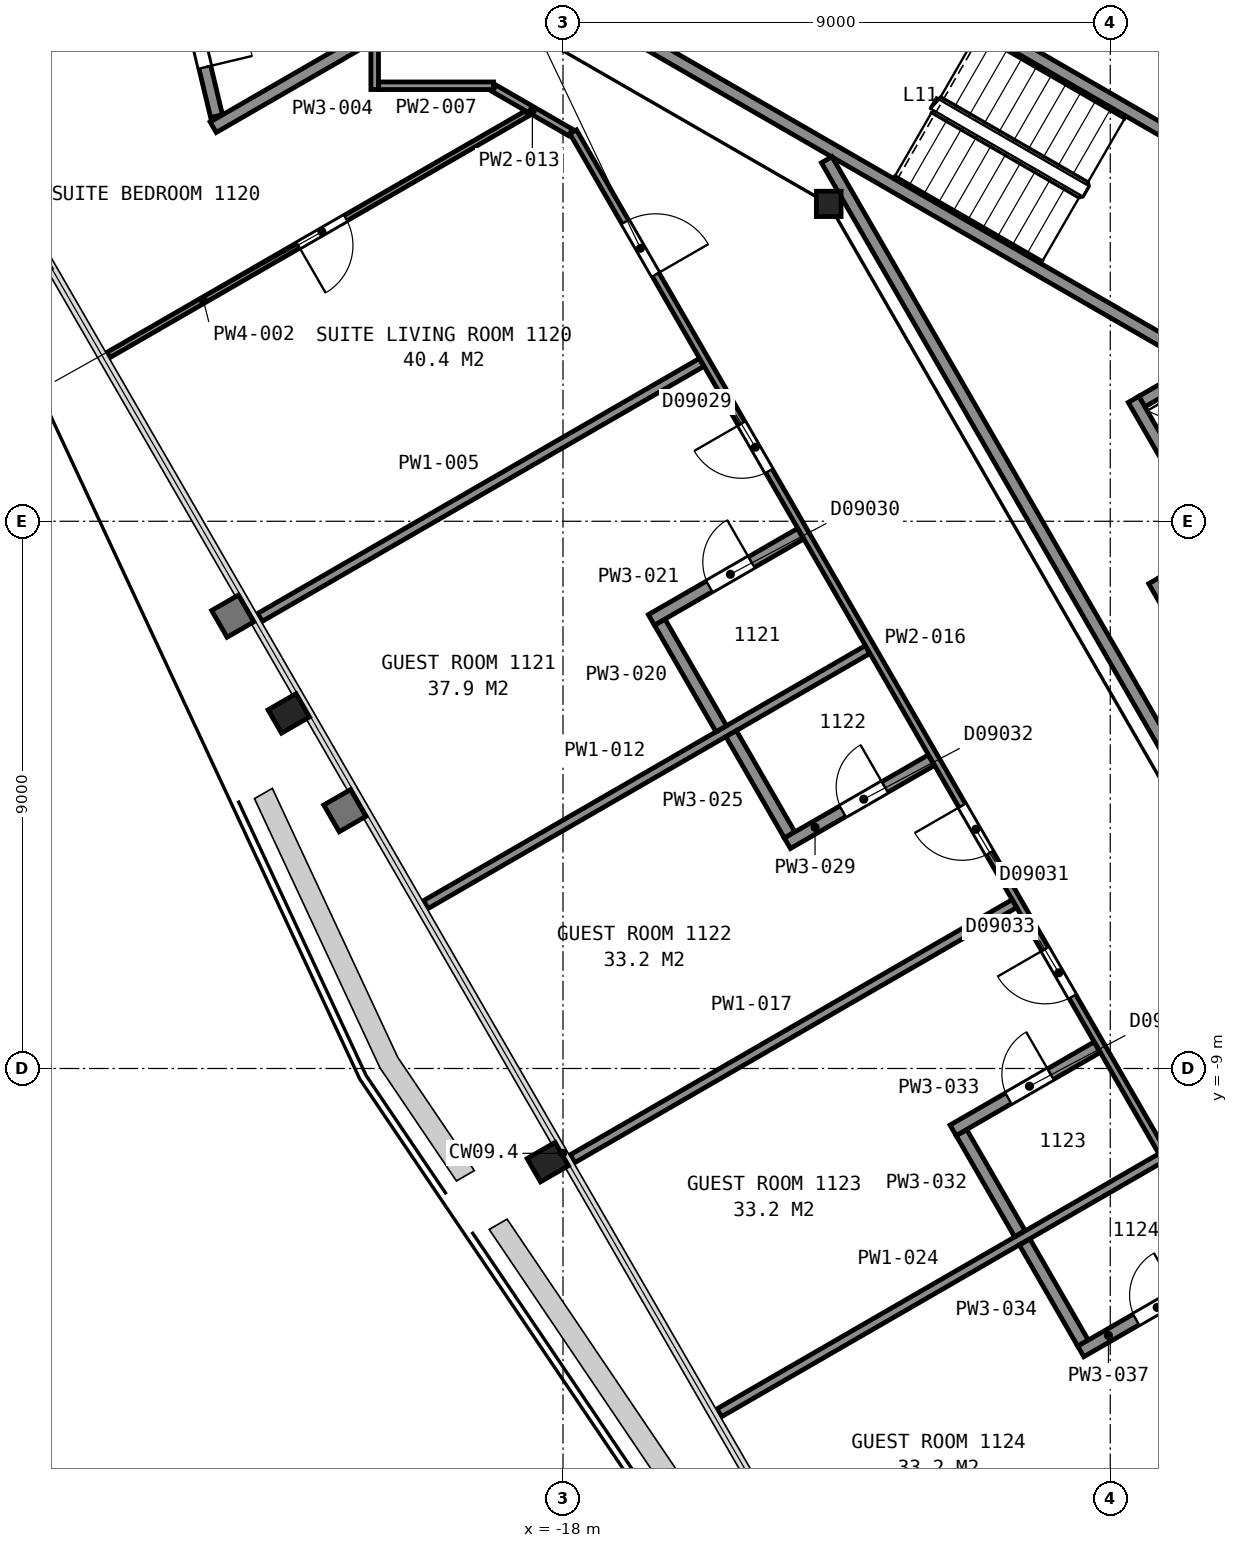
"""IFC4 building model, lengths in metres.
Left out: names, types, materials, properties, quantities, classifications, styles, units other than length and angle.
Written with IfcOpenShell. Run it as: python <this file> out.ifc"""

import sys

from ifc_helpers import new_model, si_unit, direction, frame, frame_2d, origin, origin_2d, place, context, subcontext, project, spatial, rectangle, i_section, extrude, element, fill, save


model = new_model("IFC4")
c1 = context("Model", 3, precision=1e-05, world=origin(), true_north=direction((0.0, 1.0)))
c2 = subcontext(c1, "Body", "Model", "MODEL_VIEW")
j1 = project(units=[si_unit("LENGTHUNIT", "METRE"), si_unit("PLANEANGLEUNIT", "RADIAN")], contexts=[c1])
p1 = place(None, origin())
s1 = spatial("IfcSite", under=j1, at=p1, CompositionType="ELEMENT")
p2 = place(p1, origin())
s2 = spatial("IfcBuilding", under=s1, at=p2, CompositionType="ELEMENT")
p3 = place(p2, frame((0.0, 0.0, 54.8)))
s3 = spatial("IfcBuildingStorey", under=s2, at=p3, CompositionType="ELEMENT", Elevation=54.8)
for number, where, z_axis, x_axis in (
    (1, (-22.51, -3.16, 0.0), (0.0, 0.0, 1.0), (-0.5, 0.866, 0.0)),
    (2, (-18.25, -10.54, 0.0), (0.0, 0.0, 1.0), (-0.5, 0.866, 0.0)),
):
    element("IfcColumn", number, at=place(p3, frame(where, z_axis=z_axis, x_axis=x_axis)), inside=s3, PredefinedType="COLUMN", context=c2, shape_type="SweptSolid", body=[
        extrude(i_section(OverallWidth=0.442, OverallDepth=0.531, WebThickness=0.066, FlangeThickness=0.106, FilletRadius=0.015, at=origin_2d()), origin(), (0.0, 0.0, 1.0), 3.6),
    ])
p4 = place(p3, frame((-13.63, 5.22, 0.0), z_axis=(0.0, 0.0, 1.0), x_axis=(1.0, 0.0, 0.0)))
e3 = element("IfcColumn", 3, at=p4, inside=s3, PredefinedType="COLUMN", context=c2, shape_type="SweptSolid", body=[
    extrude(i_section(OverallWidth=0.406, OverallDepth=0.417, WebThickness=0.03, FlangeThickness=0.048, FilletRadius=0.015, at=origin_2d()), origin(), (0.0, 0.0, 1.0), 3.6),
])
for number, where, z_axis, x_axis in (
    (4, (-7.678, 2.701, 0.0), (0.0, 0.0, 1.0), (-0.866, 0.5, 0.0)),
    (5, (-6.178, 5.299, 0.0), (0.0, 0.0, 1.0), (-0.866, 0.5, 0.0)),
):
    element("IfcWall", number, at=place(p3, frame(where, z_axis=z_axis, x_axis=x_axis)), inside=s3, PredefinedType="PARTITIONING", context=c2, shape_type="SweptSolid", body=[
        extrude(rectangle(XDim=12.0, YDim=0.2, at=frame_2d((6.0, 0.0))), origin(), (0.0, 0.0, 1.0), 3.35),
    ])
p5 = place(p3, frame((-8.48, 1.969, 0.0), z_axis=(0.0, 0.0, 1.0), x_axis=(0.866000020948, 0.500043961785, 0.0)))
e6 = element("IfcWall", 6, at=p5, inside=s3, PredefinedType="PARTITIONING", context=c2, shape_type="SweptSolid", body=[
    extrude(rectangle(XDim=1.95, YDim=0.2, at=frame_2d((0.975, 0.0))), origin(), (0.0, 0.0, 1.0), 3.6),
])
p6 = place(p3, frame((-7.242, -0.376, 0.0), z_axis=(0.0, 0.0, 1.0), x_axis=(-0.499996545922, 0.866027397988, 0.0)))
e7 = element("IfcWall", 7, at=p6, inside=s3, PredefinedType="PARTITIONING", context=c2, shape_type="SweptSolid", body=[
    extrude(rectangle(XDim=2.75, YDim=0.2, at=frame_2d((1.375, 0.0))), origin(), (0.0, 0.0, 1.0), 3.6),
])
p7 = place(p3, frame((-7.006, -3.185, 0.0), z_axis=(0.0, 0.0, 1.0), x_axis=(-0.499990435942, 0.866030925526, 0.0)))
e8 = element("IfcWall", 8, at=p7, inside=s3, PredefinedType="PARTITIONING", context=c2, shape_type="SweptSolid", body=[
    extrude(rectangle(XDim=2.55, YDim=0.2, at=frame_2d((1.275, 0.0))), origin(), (0.0, 0.0, 1.0), 3.6),
])
p8 = place(p3, frame((-13.664, 5.946, 0.0), z_axis=(0.0, 0.0, 1.0), x_axis=(0.499994327219, -0.866028678941, 0.0)))
e9 = element("IfcWall", 9, at=p8, inside=s3, PredefinedType="PARTITIONING", context=c2, shape_type="SweptSolid", body=[
    extrude(rectangle(XDim=23.968, YDim=0.2, at=frame_2d((11.984, 0.0))), origin(), (0.0, 0.0, 1.0), 3.35),
])
p9 = place(p3, frame((-27.967, 7.05, 0.0), z_axis=(0.0, 0.0, 1.0), x_axis=(0.86603249375, 0.499987719618, 0.0)))
e10 = element("IfcWall", 10, at=p9, inside=s3, PredefinedType="PARTITIONING", context=c2, shape_type="SweptSolid", body=[
    extrude(rectangle(XDim=8.392, YDim=0.15, at=frame_2d((4.196, 0.0))), origin(), (0.0, 0.0, 1.0), 2.613),
])
p10 = place(p3, frame((-25.476, 2.735, 0.0), z_axis=(0.0, 0.0, 1.0), x_axis=(0.866077639848, 0.499909513568, 0.0)))
e11 = element("IfcWall", 11, at=p10, inside=s3, PredefinedType="PARTITIONING", context=c2, shape_type="SweptSolid", body=[
    extrude(rectangle(XDim=7.946, YDim=0.1, at=frame_2d((3.973, 0.0))), origin(), (0.0, 0.0, 1.0), 2.613),
])
p11 = place(p10, frame((3.604, 0.0, 0.0)))
e12 = element("IfcOpeningElement", 12, at=p11, cuts=e11, PredefinedType="OPENING", context=c2, shape_type="SweptSolid", body=[
    extrude(rectangle(XDim=0.9, YDim=2.1, at=frame_2d((0.45, 1.05))), frame((0.0, 0.06, 0.0), z_axis=(0.0, -1.0, 0.0), x_axis=(1.0, 0.0, 0.0)), (0.0, 0.0, 1.0), 0.12),
])
p12 = place(p3, frame((-24.272, 9.064, 0.0), z_axis=(0.0, 0.0, 1.0), x_axis=(0.232636237171, -0.972563818551, 0.0)))
e13 = element("IfcWall", 13, at=p12, inside=s3, PredefinedType="PARTITIONING", context=c2, shape_type="SweptSolid", body=[
    extrude(rectangle(XDim=2.469, YDim=0.2, at=frame_2d((1.235, 0.0))), origin(), (0.0, 0.0, 1.0), 2.613),
])
p13 = place(p12, frame((0.842, 0.0, 0.0)))
e14 = element("IfcOpeningElement", 14, at=p13, cuts=e13, PredefinedType="OPENING", context=c2, shape_type="SweptSolid", body=[
    extrude(rectangle(XDim=0.8, YDim=2.1, at=frame_2d((0.4, 1.05))), frame((0.0, 0.11, 0.0), z_axis=(0.0, -1.0, 0.0), x_axis=(1.0, 0.0, 0.0)), (0.0, 0.0, 1.0), 0.22),
])
p14 = place(p3, frame((-23.753, 6.481, 0.0), z_axis=(0.0, 0.0, 1.0), x_axis=(0.866070680301, 0.499921570572, 0.0)))
e15 = element("IfcWall", 15, at=p14, inside=s3, PredefinedType="PARTITIONING", context=c2, shape_type="SweptSolid", body=[
    extrude(rectangle(XDim=2.937, YDim=0.2, at=frame_2d((1.468, 0.0))), origin(), (0.0, 0.0, 1.0), 2.613),
])
p15 = place(p3, frame((-22.984, -1.581, 0.0), z_axis=(0.0, 0.0, 1.0), x_axis=(0.866040157966, 0.499974444137, 0.0)))
e16 = element("IfcWall", 16, at=p15, inside=s3, PredefinedType="PARTITIONING", context=c2, shape_type="SweptSolid", body=[
    extrude(rectangle(XDim=8.387, YDim=0.15, at=frame_2d((4.193, 0.0))), origin(), (0.0, 0.0, 1.0), 2.613),
])
p16 = place(p3, frame((-21.097, 7.101, 0.0), z_axis=(0.0, 0.0, 1.0), x_axis=(0.0, 1.0, 0.0)))
e17 = element("IfcWall", 17, at=p16, inside=s3, PredefinedType="PARTITIONING", context=c2, shape_type="SweptSolid", body=[
    extrude(rectangle(XDim=3.119, YDim=0.125, at=frame_2d((1.56, 0.0))), origin(), (0.0, 0.0, 1.0), 2.613),
])
p17 = place(p3, frame((-21.032, 7.163, 0.0), z_axis=(0.0, 0.0, 1.0), x_axis=(1.0, 0.0, 0.0)))
e18 = element("IfcWall", 18, at=p17, inside=s3, PredefinedType="PARTITIONING", context=c2, shape_type="SweptSolid", body=[
    extrude(rectangle(XDim=1.888, YDim=0.125, at=frame_2d((0.944, 0.0))), origin(), (0.0, 0.0, 1.0), 2.613),
])
p18 = place(p3, frame((-20.256, -6.305, 0.0), z_axis=(0.0, 0.0, 1.0), x_axis=(0.866037818403, 0.499978496633, 0.0)))
e19 = element("IfcWall", 19, at=p18, inside=s3, PredefinedType="PARTITIONING", context=c2, shape_type="SweptSolid", body=[
    extrude(rectangle(XDim=8.391, YDim=0.15, at=frame_2d((4.196, 0.0))), origin(), (0.0, 0.0, 1.0), 2.613),
])
p19 = place(p3, frame((-19.132, 7.121, 0.0), z_axis=(0.0, 0.0, 1.0), x_axis=(0.865894215669, -0.500227155672, 0.0)))
e20 = element("IfcWall", 20, at=p19, inside=s3, PredefinedType="PARTITIONING", context=c2, shape_type="SweptSolid", body=[
    extrude(rectangle(XDim=1.451, YDim=0.125, at=frame_2d((0.726, 0.0))), origin(), (0.0, 0.0, 1.0), 2.613),
])
p20 = place(p3, frame((-3.766, -17.959, 0.0), z_axis=(0.0, 0.0, 1.0), x_axis=(-0.500002884005, 0.866023738697, 0.0)))
e21 = element("IfcWall", 21, at=p20, inside=s3, PredefinedType="PARTITIONING", context=c2, shape_type="SweptSolid", body=[
    extrude(rectangle(XDim=28.135, YDim=0.125, at=frame_2d((14.067, 0.0))), origin(), (0.0, 0.0, 1.0), 2.613),
])
p21 = place(p20, frame((25.422, 0.0, 0.0)))
e22 = element("IfcOpeningElement", 22, at=p21, cuts=e21, PredefinedType="OPENING", context=c2, shape_type="SweptSolid", body=[
    extrude(rectangle(XDim=1.0, YDim=2.1, at=frame_2d((0.5, 1.05))), frame((0.0, 0.073, 0.0), z_axis=(0.0, -1.0, 0.0), x_axis=(1.0, 0.0, 0.0)), (0.0, 0.0, 1.0), 0.145),
])
p22 = place(p20, frame((21.693, 0.0, 0.0)))
e23 = element("IfcOpeningElement", 23, at=p22, cuts=e21, PredefinedType="OPENING", context=c2, shape_type="SweptSolid", body=[
    extrude(rectangle(XDim=0.9, YDim=2.1, at=frame_2d((0.45, 1.05))), frame((0.0, 0.073, 0.0), z_axis=(0.0, -1.0, 0.0), x_axis=(1.0, 0.0, 0.0)), (0.0, 0.0, 1.0), 0.145),
])
p23 = place(p20, frame((14.438, 0.0, 0.0)))
e24 = element("IfcOpeningElement", 24, at=p23, cuts=e21, PredefinedType="OPENING", context=c2, shape_type="SweptSolid", body=[
    extrude(rectangle(XDim=0.9, YDim=2.1, at=frame_2d((0.45, 1.05))), frame((0.0, 0.073, 0.0), z_axis=(0.0, -1.0, 0.0), x_axis=(1.0, 0.0, 0.0)), (0.0, 0.0, 1.0), 0.145),
])
p24 = place(p20, frame((11.712, 0.0, 0.0)))
e25 = element("IfcOpeningElement", 25, at=p24, cuts=e21, PredefinedType="OPENING", context=c2, shape_type="SweptSolid", body=[
    extrude(rectangle(XDim=0.9, YDim=2.1, at=frame_2d((0.45, 1.05))), frame((0.0, 0.073, 0.0), z_axis=(0.0, -1.0, 0.0), x_axis=(1.0, 0.0, 0.0)), (0.0, 0.0, 1.0), 0.145),
])
p25 = place(p20, frame((4.787, 0.0, 0.0)))
e26 = element("IfcOpeningElement", 26, at=p25, cuts=e21, PredefinedType="OPENING", context=c2, shape_type="SweptSolid", body=[
    extrude(rectangle(XDim=0.9, YDim=2.1, at=frame_2d((0.45, 1.05))), frame((0.0, 0.073, 0.0), z_axis=(0.0, -1.0, 0.0), x_axis=(1.0, 0.0, 0.0)), (0.0, 0.0, 1.0), 0.145),
])
p26 = place(p20, frame((1.762, 0.0, 0.0)))
e27 = element("IfcOpeningElement", 27, at=p26, cuts=e21, PredefinedType="OPENING", context=c2, shape_type="SweptSolid", body=[
    extrude(rectangle(XDim=0.9, YDim=2.1, at=frame_2d((0.45, 1.05))), frame((0.0, 0.073, 0.0), z_axis=(0.0, -1.0, 0.0), x_axis=(1.0, 0.0, 0.0)), (0.0, 0.0, 1.0), 0.145),
])
p27 = place(p3, frame((-17.844, -10.484, 0.0), z_axis=(0.0, 0.0, 1.0), x_axis=(0.866037818403, 0.499978496633, 0.0)))
e28 = element("IfcWall", 28, at=p27, inside=s3, PredefinedType="PARTITIONING", context=c2, shape_type="SweptSolid", body=[
    extrude(rectangle(XDim=8.391, YDim=0.15, at=frame_2d((4.196, 0.0))), origin(), (0.0, 0.0, 1.0), 2.613),
])
p28 = place(p3, frame((-16.41, -1.659, 0.0), z_axis=(0.0, 0.0, 1.0), x_axis=(0.49983374806, -0.866121368112, 0.0)))
e29 = element("IfcWall", 29, at=p28, inside=s3, PredefinedType="PARTITIONING", context=c2, shape_type="SweptSolid", body=[
    extrude(rectangle(XDim=2.026, YDim=0.2, at=frame_2d((1.013, 0.0))), origin(), (0.0, 0.0, 1.0), 2.613),
])
p29 = place(p3, frame((-14.094, -0.206, 0.0), z_axis=(0.0, 0.0, 1.0), x_axis=(-0.866033446572, -0.499986069224, 0.0)))
e30 = element("IfcWall", 30, at=p29, inside=s3, PredefinedType="PARTITIONING", context=c2, shape_type="SweptSolid", body=[
    extrude(rectangle(XDim=2.833, YDim=0.2, at=frame_2d((1.416, 0.0))), origin(), (0.0, 0.0, 1.0), 2.613),
])
p30 = place(p29, frame((0.933, 0.0, 0.0)))
e31 = element("IfcOpeningElement", 31, at=p30, cuts=e30, PredefinedType="OPENING", context=c2, shape_type="SweptSolid", body=[
    extrude(rectangle(XDim=0.8, YDim=2.1, at=frame_2d((0.4, 1.05))), frame((0.0, 0.11, 0.0), z_axis=(0.0, -1.0, 0.0), x_axis=(1.0, 0.0, 0.0)), (0.0, 0.0, 1.0), 0.22),
])
p31 = place(p3, frame((-15.431, -14.663, 0.0), z_axis=(0.0, 0.0, 1.0), x_axis=(0.866027553047, 0.499996277349, 0.0)))
e32 = element("IfcWall", 32, at=p31, inside=s3, PredefinedType="PARTITIONING", context=c2, shape_type="SweptSolid", body=[
    extrude(rectangle(XDim=8.387, YDim=0.15, at=frame_2d((4.193, 0.0))), origin(), (0.0, 0.0, 1.0), 2.613),
])
p32 = place(p3, frame((-15.236, -3.493, 0.0), z_axis=(0.0, 0.0, 1.0), x_axis=(0.500190942922, -0.865915134767, 0.0)))
e33 = element("IfcWall", 33, at=p32, inside=s3, PredefinedType="PARTITIONING", context=c2, shape_type="SweptSolid", body=[
    extrude(rectangle(XDim=1.925, YDim=0.2, at=frame_2d((0.962, 0.0))), origin(), (0.0, 0.0, 1.0), 2.613),
])
p33 = place(p3, frame((-14.31, -5.296, 0.0), z_axis=(0.0, 0.0, 1.0), x_axis=(0.866012976267, 0.500021524473, 0.0)))
e34 = element("IfcWall", 34, at=p33, inside=s3, PredefinedType="PARTITIONING", context=c2, shape_type="SweptSolid", body=[
    extrude(rectangle(XDim=2.732, YDim=0.2, at=frame_2d((1.366, 0.0))), origin(), (0.0, 0.0, 1.0), 2.613),
])
p34 = place(p33, frame((1.05, 0.0, 0.0)))
e35 = element("IfcOpeningElement", 35, at=p34, cuts=e34, PredefinedType="OPENING", context=c2, shape_type="SweptSolid", body=[
    extrude(rectangle(XDim=0.8, YDim=2.1, at=frame_2d((0.4, 1.05))), frame((0.0, 0.11, 0.0), z_axis=(0.0, -1.0, 0.0), x_axis=(1.0, 0.0, 0.0)), (0.0, 0.0, 1.0), 0.22),
])
p35 = place(p3, frame((-13.018, -18.842, 0.0), z_axis=(0.0, 0.0, 1.0), x_axis=(0.866003398047, 0.500038113118, 0.0)))
e36 = element("IfcWall", 36, at=p35, inside=s3, PredefinedType="PARTITIONING", context=c2, shape_type="SweptSolid", body=[
    extrude(rectangle(XDim=8.391, YDim=0.15, at=frame_2d((4.195, 0.0))), origin(), (0.0, 0.0, 1.0), 2.613),
])
p36 = place(p3, frame((-11.448, -10.053, 0.0), z_axis=(0.0, 0.0, 1.0), x_axis=(0.500214044309, -0.865901789971, 0.0)))
e37 = element("IfcWall", 37, at=p36, inside=s3, PredefinedType="PARTITIONING", context=c2, shape_type="SweptSolid", body=[
    extrude(rectangle(XDim=1.92, YDim=0.2, at=frame_2d((0.96, 0.0))), origin(), (0.0, 0.0, 1.0), 2.613),
])
p37 = place(p3, frame((-9.218, -8.651, 0.0), z_axis=(0.0, 0.0, 1.0), x_axis=(-0.866063622699, -0.499933797055, 0.0)))
e38 = element("IfcWall", 38, at=p37, inside=s3, PredefinedType="PARTITIONING", context=c2, shape_type="SweptSolid", body=[
    extrude(rectangle(XDim=2.733, YDim=0.2, at=frame_2d((1.367, 0.0))), origin(), (0.0, 0.0, 1.0), 2.613),
])
p38 = place(p37, frame((0.883, 0.0, 0.0)))
e39 = element("IfcOpeningElement", 39, at=p38, cuts=e38, PredefinedType="OPENING", context=c2, shape_type="SweptSolid", body=[
    extrude(rectangle(XDim=0.8, YDim=2.1, at=frame_2d((0.4, 1.05))), frame((0.0, 0.11, 0.0), z_axis=(0.0, -1.0, 0.0), x_axis=(1.0, 0.0, 0.0)), (0.0, 0.0, 1.0), 0.22),
])
p39 = place(p3, frame((-10.407, -11.855, 0.0), z_axis=(0.0, 0.0, 1.0), x_axis=(0.499887618105, -0.86609027778, 0.0)))
e40 = element("IfcWall", 40, at=p39, inside=s3, PredefinedType="PARTITIONING", context=c2, shape_type="SweptSolid", body=[
    extrude(rectangle(XDim=1.919, YDim=0.2, at=frame_2d((0.96, 0.0))), origin(), (0.0, 0.0, 1.0), 2.613),
])
p40 = place(p3, frame((-9.485, -13.654, 0.0), z_axis=(0.0, 0.0, 1.0), x_axis=(0.866102295869, 0.499866795347, 0.0)))
e41 = element("IfcWall", 41, at=p40, inside=s3, PredefinedType="PARTITIONING", context=c2, shape_type="SweptSolid", body=[
    extrude(rectangle(XDim=2.733, YDim=0.2, at=frame_2d((1.367, 0.0))), origin(), (0.0, 0.0, 1.0), 2.613),
])
p41 = place(p40, frame((1.05, 0.0, 0.0)))
e42 = element("IfcOpeningElement", 42, at=p41, cuts=e41, PredefinedType="OPENING", context=c2, shape_type="SweptSolid", body=[
    extrude(rectangle(XDim=0.8, YDim=2.1, at=frame_2d((0.4, 1.05))), frame((0.0, 0.11, 0.0), z_axis=(0.0, -1.0, 0.0), x_axis=(1.0, 0.0, 0.0)), (0.0, 0.0, 1.0), 0.22),
])
p42 = place(p11, origin())
e43 = element("IfcDoor", 43, at=p42, inside=s3, OperationType="SINGLE_SWING_LEFT", PredefinedType="DOOR", context=c2, shape_type="SweptSolid", body=[
    extrude(rectangle(XDim=0.9, YDim=2.1, at=frame_2d((0.45, 1.05))), frame((0.0, 0.025, 0.0), z_axis=(0.0, -1.0, 0.0), x_axis=(1.0, 0.0, 0.0)), (0.0, 0.0, 1.0), 0.05),
])
fill(e12, e43)
p43 = place(p13, origin())
e44 = element("IfcDoor", 44, at=p43, inside=s3, OperationType="SINGLE_SWING_RIGHT", PredefinedType="DOOR", context=c2, shape_type="SweptSolid", body=[
    extrude(rectangle(XDim=0.8, YDim=2.1, at=frame_2d((0.4, 1.05))), frame((0.0, 0.025, 0.0), z_axis=(0.0, -1.0, 0.0), x_axis=(1.0, 0.0, 0.0)), (0.0, 0.0, 1.0), 0.05),
])
fill(e14, e44)
p44 = place(p21, origin())
e45 = element("IfcDoor", 45, at=p44, inside=s3, OperationType="SINGLE_SWING_LEFT", PredefinedType="DOOR", context=c2, shape_type="SweptSolid", body=[
    extrude(rectangle(XDim=1.0, YDim=2.1, at=frame_2d((0.5, 1.05))), frame((0.0, 0.025, 0.0), z_axis=(0.0, -1.0, 0.0), x_axis=(1.0, 0.0, 0.0)), (0.0, 0.0, 1.0), 0.05),
])
fill(e22, e45)
p45 = place(p22, origin())
e46 = element("IfcDoor", 46, at=p45, inside=s3, OperationType="SINGLE_SWING_RIGHT", PredefinedType="DOOR", context=c2, shape_type="SweptSolid", body=[
    extrude(rectangle(XDim=0.9, YDim=2.1, at=frame_2d((0.45, 1.05))), frame((0.0, 0.025, 0.0), z_axis=(0.0, -1.0, 0.0), x_axis=(1.0, 0.0, 0.0)), (0.0, 0.0, 1.0), 0.05),
])
fill(e23, e46)
p46 = place(p23, origin())
e47 = element("IfcDoor", 47, at=p46, inside=s3, OperationType="SINGLE_SWING_RIGHT", PredefinedType="DOOR", context=c2, shape_type="SweptSolid", body=[
    extrude(rectangle(XDim=0.9, YDim=2.1, at=frame_2d((0.45, 1.05))), frame((0.0, 0.025, 0.0), z_axis=(0.0, -1.0, 0.0), x_axis=(1.0, 0.0, 0.0)), (0.0, 0.0, 1.0), 0.05),
])
fill(e24, e47)
p47 = place(p24, origin())
e48 = element("IfcDoor", 48, at=p47, inside=s3, OperationType="SINGLE_SWING_RIGHT", PredefinedType="DOOR", context=c2, shape_type="SweptSolid", body=[
    extrude(rectangle(XDim=0.9, YDim=2.1, at=frame_2d((0.45, 1.05))), frame((0.0, 0.025, 0.0), z_axis=(0.0, -1.0, 0.0), x_axis=(1.0, 0.0, 0.0)), (0.0, 0.0, 1.0), 0.05),
])
fill(e25, e48)
p48 = place(p30, origin())
e49 = element("IfcDoor", 49, at=p48, inside=s3, OperationType="SINGLE_SWING_LEFT", PredefinedType="DOOR", context=c2, shape_type="SweptSolid", body=[
    extrude(rectangle(XDim=0.8, YDim=2.1, at=frame_2d((0.4, 1.05))), frame((0.0, 0.025, 0.0), z_axis=(0.0, -1.0, 0.0), x_axis=(1.0, 0.0, 0.0)), (0.0, 0.0, 1.0), 0.05),
])
fill(e31, e49)
p49 = place(p34, origin())
e50 = element("IfcDoor", 50, at=p49, inside=s3, OperationType="SINGLE_SWING_RIGHT", PredefinedType="DOOR", context=c2, shape_type="SweptSolid", body=[
    extrude(rectangle(XDim=0.8, YDim=2.1, at=frame_2d((0.4, 1.05))), frame((0.0, 0.025, 0.0), z_axis=(0.0, -1.0, 0.0), x_axis=(1.0, 0.0, 0.0)), (0.0, 0.0, 1.0), 0.05),
])
fill(e35, e50)
p50 = place(p38, origin())
e51 = element("IfcDoor", 51, at=p50, inside=s3, OperationType="SINGLE_SWING_LEFT", PredefinedType="DOOR", context=c2, shape_type="SweptSolid", body=[
    extrude(rectangle(XDim=0.8, YDim=2.1, at=frame_2d((0.4, 1.05))), frame((0.0, 0.025, 0.0), z_axis=(0.0, -1.0, 0.0), x_axis=(1.0, 0.0, 0.0)), (0.0, 0.0, 1.0), 0.05),
])
fill(e39, e51)
p51 = place(p41, origin())
e52 = element("IfcDoor", 52, at=p51, inside=s3, OperationType="SINGLE_SWING_RIGHT", PredefinedType="DOOR", context=c2, shape_type="SweptSolid", body=[
    extrude(rectangle(XDim=0.8, YDim=2.1, at=frame_2d((0.4, 1.05))), frame((0.0, 0.025, 0.0), z_axis=(0.0, -1.0, 0.0), x_axis=(1.0, 0.0, 0.0)), (0.0, 0.0, 1.0), 0.05),
])
fill(e42, e52)
save(model, sys.argv[1])
